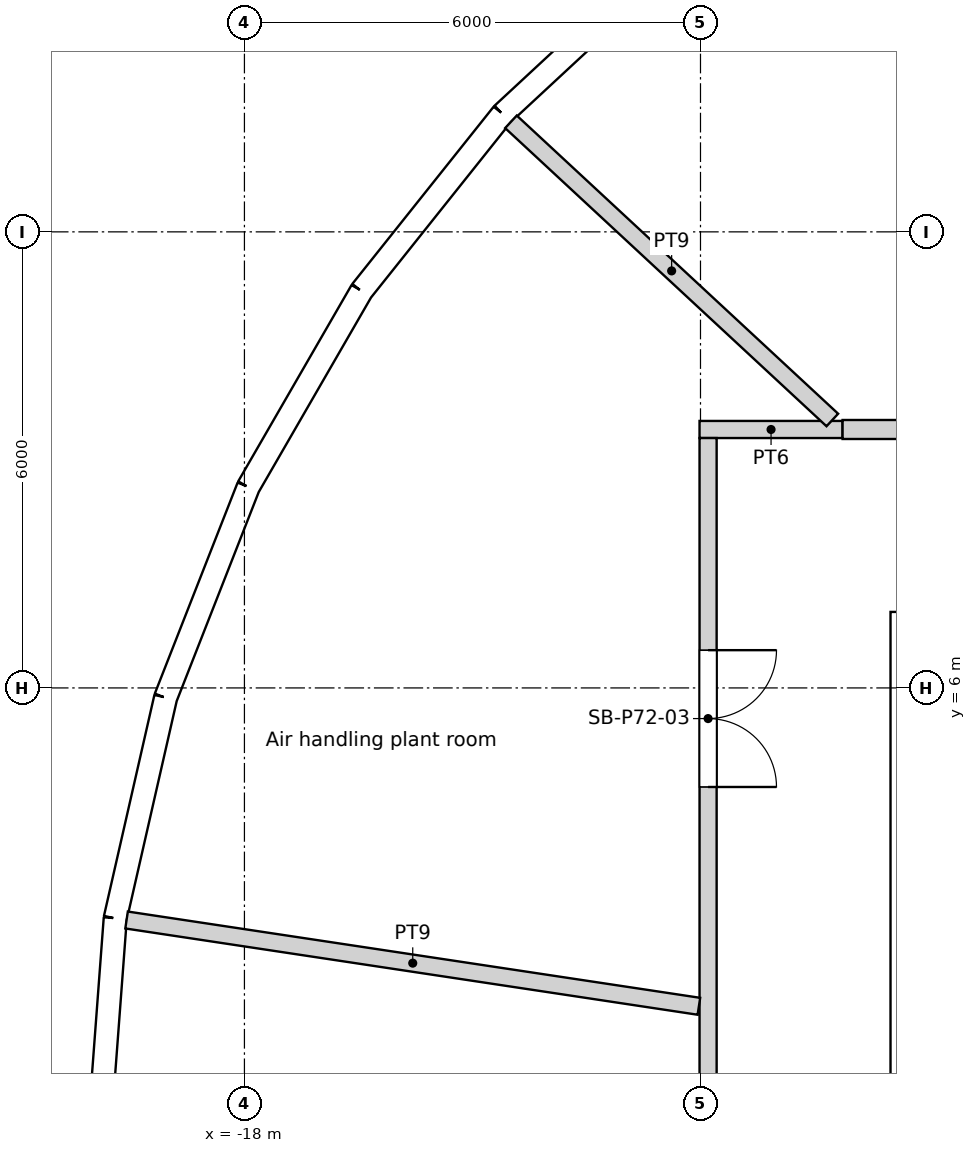
"""IFC4 building model, lengths in metres.
Left out: names, types, materials, properties, quantities, classifications, styles, units other than length and angle.
Written with IfcOpenShell. Run it as: python <this file> out.ifc"""

import sys

from ifc_helpers import new_model, si_unit, direction, frame, frame_2d, origin, origin_2d, place, context, subcontext, project, spatial, rectangle, circle, extrude, element, fill, save


model = new_model("IFC4")
c1 = context("Model", 3, precision=1e-05, world=origin(), true_north=direction((0.0, 1.0)))
c2 = subcontext(c1, "Body", "Model", "MODEL_VIEW")
j1 = project(units=[si_unit("LENGTHUNIT", "METRE"), si_unit("PLANEANGLEUNIT", "RADIAN")], contexts=[c1])
p1 = place(None, origin())
s1 = spatial("IfcSite", under=j1, at=p1, CompositionType="ELEMENT")
p2 = place(p1, origin())
s2 = spatial("IfcBuilding", under=s1, at=p2, CompositionType="ELEMENT")
p3 = place(p2, frame((0.0, 0.0, 277.8)))
s3 = spatial("IfcBuildingStorey", under=s2, at=p3, CompositionType="ELEMENT", Elevation=277.8)
for number, where, z_axis, x_axis in (
    (1, (-13.798, 12.802, 0.0), (0.0, 0.0, 1.0), (1.0, 0.0, 0.0)),
    (2, (-16.958, 8.167, 0.0), (0.0, 0.0, 1.0), (1.0, 0.0, 0.0)),
    (3, (-18.612, 2.805, 0.0), (0.0, 0.0, 1.0), (1.0, 0.0, 0.0)),
):
    element("IfcColumn", number, at=place(p3, frame(where, z_axis=z_axis, x_axis=x_axis)), inside=s3, PredefinedType="COLUMN", context=c2, shape_type="SweptSolid", body=[
        extrude(circle(Radius=0.55, at=origin_2d()), origin(), (0.0, 0.0, 1.0), 6.0),
    ])
p4 = place(p3, frame((-12.421, 15.575, 0.0), z_axis=(0.0, 0.0, 1.0), x_axis=(-0.733056277766, -0.68016798927, 0.0)))
e4 = element("IfcWall", 4, at=p4, inside=s3, PredefinedType="SOLIDWALL", context=c2, shape_type="SweptSolid", body=[
    extrude(rectangle(XDim=2.978, YDim=0.3, at=frame_2d((1.489, 0.0))), origin(), (0.0, 0.0, 1.0), 5.65),
])
p5 = place(p4, frame((1.489, 0.0, 1.825)))
e5 = element("IfcOpeningElement", 5, at=p5, cuts=e4, PredefinedType="OPENING", context=c2, shape_type="SweptSolid", body=[
    extrude(circle(Radius=1.2, at=origin_2d()), frame((0.0, 0.16, 0.0), z_axis=(0.0, -1.0, 0.0), x_axis=(1.0, 0.0, 0.0)), (0.0, 0.0, 1.0), 0.32),
])
p6 = place(p3, frame((-14.604, 13.55, 0.0), z_axis=(0.0, 0.0, 1.0), x_axis=(-0.623494374707, -0.781827835722, 0.0)))
e6 = element("IfcWall", 6, at=p6, inside=s3, PredefinedType="SOLIDWALL", context=c2, shape_type="SweptSolid", body=[
    extrude(rectangle(XDim=2.978, YDim=0.3, at=frame_2d((1.489, 0.0))), origin(), (0.0, 0.0, 1.0), 5.2),
])
p7 = place(p6, frame((1.489, 0.0, 1.825)))
e7 = element("IfcOpeningElement", 7, at=p7, cuts=e6, PredefinedType="OPENING", context=c2, shape_type="SweptSolid", body=[
    extrude(circle(Radius=1.2, at=origin_2d()), frame((0.0, 0.16, 0.0), z_axis=(0.0, -1.0, 0.0), x_axis=(1.0, 0.0, 0.0)), (0.0, 0.0, 1.0), 0.32),
])
p8 = place(p3, frame((-16.46, 11.222, 0.0), z_axis=(0.0, 0.0, 1.0), x_axis=(-0.500001626982, -0.866024464444, 0.0)))
e8 = element("IfcWall", 8, at=p8, inside=s3, PredefinedType="SOLIDWALL", context=c2, shape_type="SweptSolid", body=[
    extrude(rectangle(XDim=2.978, YDim=0.3, at=frame_2d((1.489, 0.0))), origin(), (0.0, 0.0, 1.0), 5.65),
])
p9 = place(p8, frame((1.489, 0.0, 1.825)))
e9 = element("IfcOpeningElement", 9, at=p9, cuts=e8, PredefinedType="OPENING", context=c2, shape_type="SweptSolid", body=[
    extrude(circle(Radius=1.2, at=origin_2d()), frame((0.0, 0.16, 0.0), z_axis=(0.0, -1.0, 0.0), x_axis=(1.0, 0.0, 0.0)), (0.0, 0.0, 1.0), 0.32),
])
p10 = place(p3, frame((-17.949, 8.644, 0.0), z_axis=(0.0, 0.0, 1.0), x_axis=(-0.365289571566, -0.930893940739, 0.0)))
e10 = element("IfcWall", 10, at=p10, inside=s3, PredefinedType="SOLIDWALL", context=c2, shape_type="SweptSolid", body=[
    extrude(rectangle(XDim=2.978, YDim=0.3, at=frame_2d((1.489, 0.0))), origin(), (0.0, 0.0, 1.0), 5.65),
])
p11 = place(p10, frame((1.489, 0.0, 1.825)))
e11 = element("IfcOpeningElement", 11, at=p11, cuts=e10, PredefinedType="OPENING", context=c2, shape_type="SweptSolid", body=[
    extrude(circle(Radius=1.2, at=origin_2d()), frame((0.0, 0.16, 0.0), z_axis=(0.0, -1.0, 0.0), x_axis=(1.0, 0.0, 0.0)), (0.0, 0.0, 1.0), 0.32),
])
p12 = place(p3, frame((-19.037, 5.872, 0.0), z_axis=(0.0, 0.0, 1.0), x_axis=(-0.222535358937, -0.974924619662, 0.0)))
e12 = element("IfcWall", 12, at=p12, inside=s3, PredefinedType="SOLIDWALL", context=c2, shape_type="SweptSolid", body=[
    extrude(rectangle(XDim=2.978, YDim=0.3, at=frame_2d((1.489, 0.0))), origin(), (0.0, 0.0, 1.0), 5.2),
])
p13 = place(p12, frame((1.489, 0.0, 1.825)))
e13 = element("IfcOpeningElement", 13, at=p13, cuts=e12, PredefinedType="OPENING", context=c2, shape_type="SweptSolid", body=[
    extrude(circle(Radius=1.2, at=origin_2d()), frame((0.0, 0.16, 0.0), z_axis=(0.0, -1.0, 0.0), x_axis=(1.0, 0.0, 0.0)), (0.0, 0.0, 1.0), 0.32),
])
p14 = place(p3, frame((-19.699, 2.969, 0.0), z_axis=(0.0, 0.0, 1.0), x_axis=(-0.074777718064, -0.997200227076, 0.0)))
e14 = element("IfcWall", 14, at=p14, inside=s3, PredefinedType="SOLIDWALL", context=c2, shape_type="SweptSolid", body=[
    extrude(rectangle(XDim=2.978, YDim=0.3, at=frame_2d((1.489, 0.0))), origin(), (0.0, 0.0, 1.0), 5.65),
])
p15 = place(p14, frame((1.489, 0.0, 1.825)))
e15 = element("IfcOpeningElement", 15, at=p15, cuts=e14, PredefinedType="OPENING", context=c2, shape_type="SweptSolid", body=[
    extrude(circle(Radius=1.2, at=origin_2d()), frame((0.0, 0.16, 0.0), z_axis=(0.0, -1.0, 0.0), x_axis=(1.0, 0.0, 0.0)), (0.0, 0.0, 1.0), 0.32),
])
p16 = place(p3, frame((-9.5, 6.7, 0.0), z_axis=(0.0, 0.0, 1.0), x_axis=(1.0, 0.0, 0.0)))
e16 = element("IfcWall", 16, at=p16, inside=s3, PredefinedType="SOLIDWALL", context=c2, shape_type="SweptSolid", body=[
    extrude(rectangle(XDim=19.0, YDim=0.6, at=frame_2d((9.5, 0.0))), origin(), (0.0, 0.0, 1.0), 6.0),
])
p17 = place(p16, frame((5.35, 0.0, 0.0)))
e17 = element("IfcOpeningElement", 17, at=p17, cuts=e16, PredefinedType="OPENING", context=c2, shape_type="SweptSolid", body=[
    extrude(rectangle(XDim=1.7, YDim=2.1, at=frame_2d((0.85, 1.05))), frame((0.0, 0.3, 0.0), z_axis=(0.0, -1.0, 0.0), x_axis=(1.0, 0.0, 0.0)), (0.0, 0.0, 1.0), 0.6),
])
p18 = place(p3, frame((-9.2, -6.4, 0.0), z_axis=(0.0, 0.0, 1.0), x_axis=(0.0, 1.0, 0.0)))
e18 = element("IfcWall", 18, at=p18, inside=s3, PredefinedType="SOLIDWALL", context=c2, shape_type="SweptSolid", body=[
    extrude(rectangle(XDim=12.8, YDim=0.6, at=frame_2d((6.4, 0.0))), origin(), (0.0, 0.0, 1.0), 6.0),
])
p19 = place(p3, frame((-19.551, 2.947, 0.0), z_axis=(0.0, 0.0, 1.0), x_axis=(0.988828618492, -0.14905691279, 0.0)))
e19 = element("IfcWall", 19, at=p19, inside=s3, PredefinedType="PARTITIONING", context=c2, shape_type="SweptSolid", body=[
    extrude(rectangle(XDim=7.615, YDim=0.225, at=frame_2d((3.807, 0.0))), origin(), (0.0, 0.0, 1.0), 2.7),
])
p20 = place(p3, frame((-14.493, 13.448, 0.0), z_axis=(0.0, 0.0, 1.0), x_axis=(0.733046716658, -0.680178293682, 0.0)))
e20 = element("IfcWall", 20, at=p20, inside=s3, PredefinedType="PARTITIONING", context=c2, shape_type="SweptSolid", body=[
    extrude(rectangle(XDim=5.768, YDim=0.225, at=frame_2d((2.884, 0.0))), origin(), (0.0, 0.0, 1.0), 2.7),
])
p21 = place(p3, frame((-11.9, 9.288, 0.0), z_axis=(0.0, 0.0, 1.0), x_axis=(0.0, -1.0, 0.0)))
e21 = element("IfcWall", 21, at=p21, inside=s3, PredefinedType="PARTITIONING", context=c2, shape_type="SweptSolid", body=[
    extrude(rectangle(XDim=18.8, YDim=0.225, at=frame_2d((9.4, 0.0))), origin(), (0.0, 0.0, 1.0), 5.65),
])
p22 = place(p21, frame((2.791, 0.0, 0.0)))
e22 = element("IfcOpeningElement", 22, at=p22, cuts=e21, PredefinedType="OPENING", context=c2, shape_type="SweptSolid", body=[
    extrude(rectangle(XDim=1.8, YDim=2.4, at=frame_2d((0.9, 1.2))), frame((0.0, 0.113, 0.0), z_axis=(0.0, -1.0, 0.0), x_axis=(1.0, 0.0, 0.0)), (0.0, 0.0, 1.0), 0.225),
])
p23 = place(p21, frame((12.591, 0.0, 0.0)))
e23 = element("IfcOpeningElement", 23, at=p23, cuts=e21, PredefinedType="OPENING", context=c2, shape_type="SweptSolid", body=[
    extrude(rectangle(XDim=1.0, YDim=2.1, at=frame_2d((0.5, 1.05))), frame((0.0, 0.113, 0.0), z_axis=(0.0, -1.0, 0.0), x_axis=(1.0, 0.0, 0.0)), (0.0, 0.0, 1.0), 0.225),
])
p24 = place(p3, frame((-10.131, 9.4, 0.0), z_axis=(0.0, 0.0, 1.0), x_axis=(-1.0, 0.0, 0.0)))
e24 = element("IfcWall", 24, at=p24, inside=s3, PredefinedType="PARTITIONING", context=c2, shape_type="SweptSolid", body=[
    extrude(rectangle(XDim=1.882, YDim=0.225, at=frame_2d((0.941, 0.0))), origin(), (0.0, 0.0, 1.0), 5.65),
])
p25 = place(p3, frame((-7.496, 9.4, 0.0), z_axis=(0.0, 0.0, 1.0), x_axis=(-1.0, 0.0, 0.0)))
e25 = element("IfcWall", 25, at=p25, inside=s3, PredefinedType="PARTITIONING", context=c2, shape_type="SweptSolid", body=[
    extrude(rectangle(XDim=2.635, YDim=0.25, at=frame_2d((1.317, 0.0))), origin(), (0.0, 0.0, 1.0), 5.65),
])
p26 = place(p5, origin())
e26 = element("IfcWindow", 26, at=p26, inside=s3, PartitioningType="SINGLE_PANEL", PredefinedType="WINDOW", context=c2, shape_type="SweptSolid", body=[
    extrude(circle(Radius=1.2, at=origin_2d()), frame((0.0, 0.12, 0.0), z_axis=(0.0, -1.0, 0.0), x_axis=(1.0, 0.0, 0.0)), (0.0, 0.0, 1.0), 0.1),
])
fill(e5, e26)
p27 = place(p7, origin())
e27 = element("IfcWindow", 27, at=p27, inside=s3, PartitioningType="SINGLE_PANEL", PredefinedType="WINDOW", context=c2, shape_type="SweptSolid", body=[
    extrude(circle(Radius=1.2, at=origin_2d()), frame((0.0, 0.12, 0.0), z_axis=(0.0, -1.0, 0.0), x_axis=(1.0, 0.0, 0.0)), (0.0, 0.0, 1.0), 0.1),
])
fill(e7, e27)
p28 = place(p9, origin())
e28 = element("IfcWindow", 28, at=p28, inside=s3, PartitioningType="SINGLE_PANEL", PredefinedType="WINDOW", context=c2, shape_type="SweptSolid", body=[
    extrude(circle(Radius=1.2, at=origin_2d()), frame((0.0, 0.12, 0.0), z_axis=(0.0, -1.0, 0.0), x_axis=(1.0, 0.0, 0.0)), (0.0, 0.0, 1.0), 0.1),
])
fill(e9, e28)
p29 = place(p11, origin())
e29 = element("IfcWindow", 29, at=p29, inside=s3, PartitioningType="SINGLE_PANEL", PredefinedType="WINDOW", context=c2, shape_type="SweptSolid", body=[
    extrude(circle(Radius=1.2, at=origin_2d()), frame((0.0, 0.12, 0.0), z_axis=(0.0, -1.0, 0.0), x_axis=(1.0, 0.0, 0.0)), (0.0, 0.0, 1.0), 0.1),
])
fill(e11, e29)
p30 = place(p13, origin())
e30 = element("IfcWindow", 30, at=p30, inside=s3, PartitioningType="SINGLE_PANEL", PredefinedType="WINDOW", context=c2, shape_type="SweptSolid", body=[
    extrude(circle(Radius=1.2, at=origin_2d()), frame((0.0, 0.12, 0.0), z_axis=(0.0, -1.0, 0.0), x_axis=(1.0, 0.0, 0.0)), (0.0, 0.0, 1.0), 0.1),
])
fill(e13, e30)
p31 = place(p15, origin())
e31 = element("IfcWindow", 31, at=p31, inside=s3, PartitioningType="SINGLE_PANEL", PredefinedType="WINDOW", context=c2, shape_type="SweptSolid", body=[
    extrude(circle(Radius=1.2, at=origin_2d()), frame((0.0, 0.12, 0.0), z_axis=(0.0, -1.0, 0.0), x_axis=(1.0, 0.0, 0.0)), (0.0, 0.0, 1.0), 0.1),
])
fill(e15, e31)
p32 = place(p22, origin())
e32 = element("IfcDoor", 32, at=p32, inside=s3, OperationType="DOUBLE_DOOR_SINGLE_SWING", PredefinedType="DOOR", context=c2, shape_type="SweptSolid", body=[
    extrude(rectangle(XDim=1.8, YDim=2.4, at=frame_2d((0.9, 1.2))), frame((0.0, 0.025, 0.0), z_axis=(0.0, -1.0, 0.0), x_axis=(1.0, 0.0, 0.0)), (0.0, 0.0, 1.0), 0.05),
])
fill(e22, e32)
save(model, sys.argv[1])
